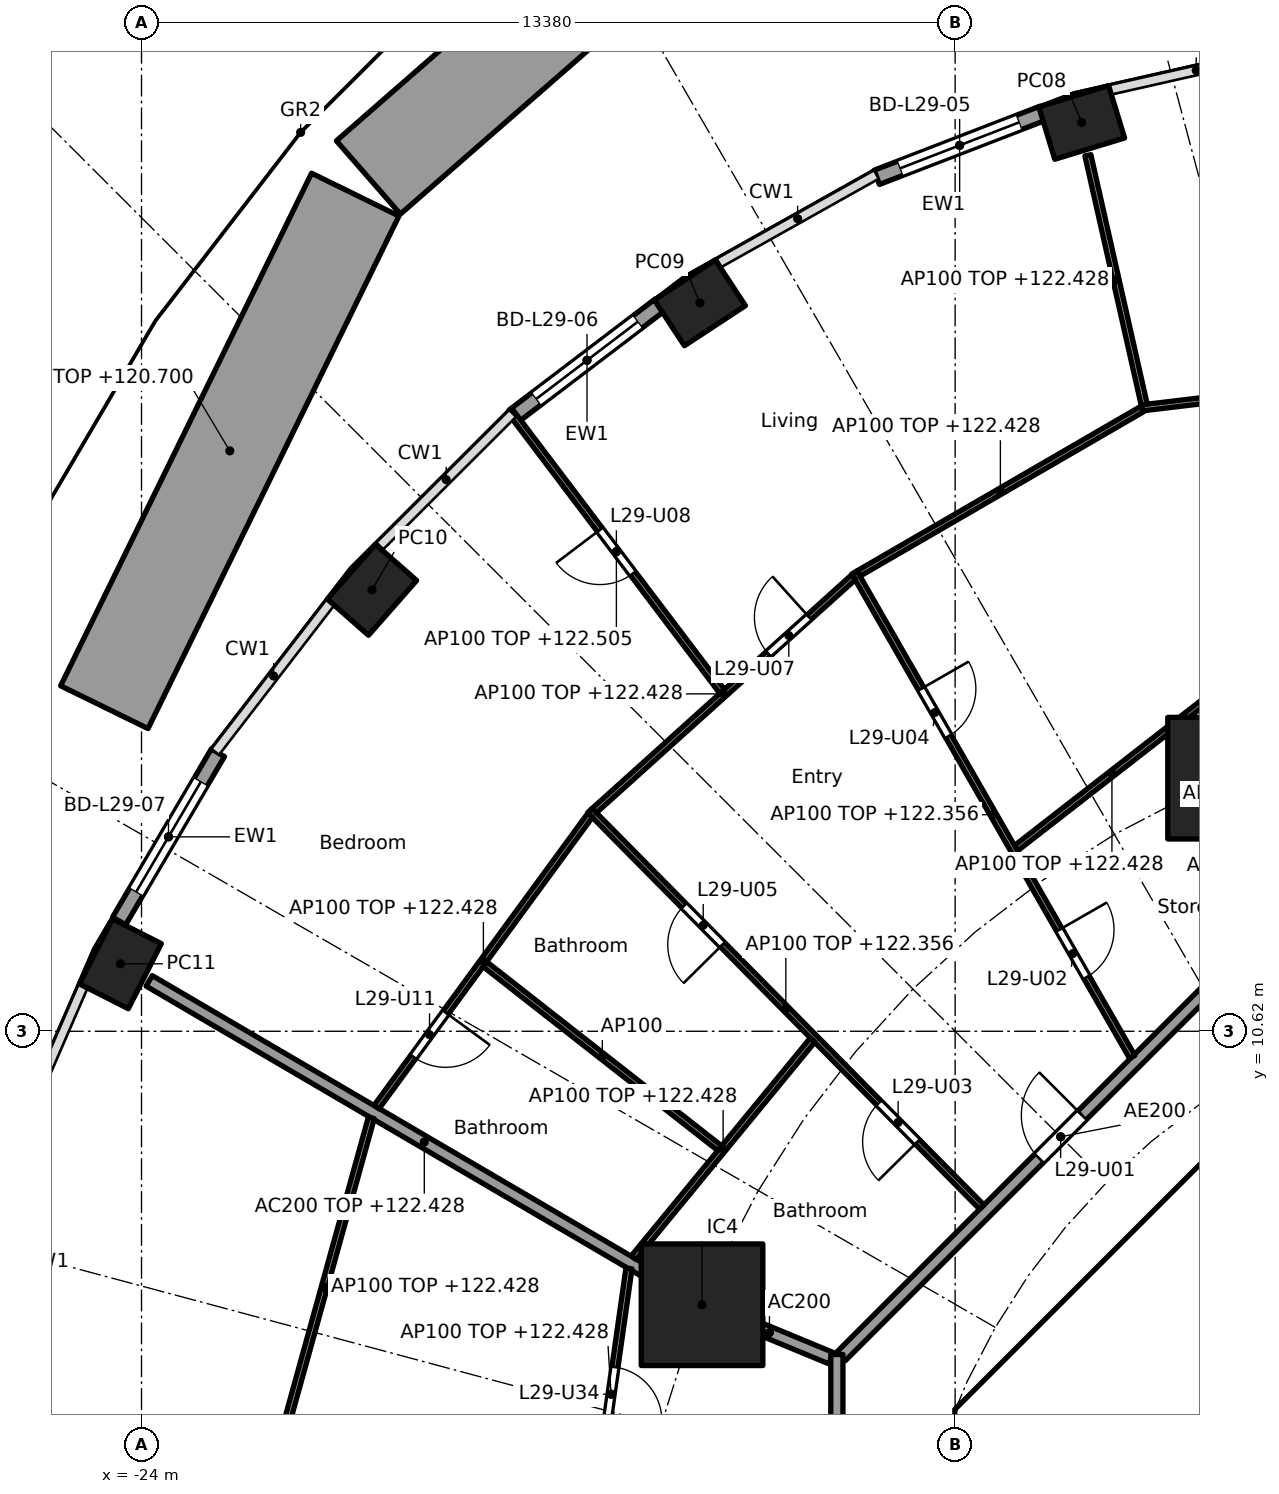
"""IFC4 building model, lengths in metres.
Left out: names, types, materials, properties, quantities, classifications, styles, units other than length and angle.
Written with IfcOpenShell. Run it as: python <this file> out.ifc"""

import sys

from ifc_helpers import new_model, si_unit, direction, frame, frame_2d, origin, origin_2d, place, context, subcontext, project, spatial, polyline, rectangle, hollow_rectangle, outline, extrude, element, fill, save


model = new_model("IFC4")
c1 = context("Model", 3, precision=1e-05, world=origin(), true_north=direction((0.0, 1.0)))
c2 = subcontext(c1, "Body", "Model", "MODEL_VIEW")
j1 = project(units=[si_unit("LENGTHUNIT", "METRE"), si_unit("PLANEANGLEUNIT", "RADIAN")], contexts=[c1])
p1 = place(None, origin())
s1 = spatial("IfcSite", under=j1, at=p1, CompositionType="ELEMENT")
p2 = place(p1, origin())
s2 = spatial("IfcBuilding", under=s1, at=p2, CompositionType="ELEMENT")
p3 = place(p2, frame((0.0, 0.0, 119.6)))
s3 = spatial("IfcBuildingStorey", under=s2, at=p3, CompositionType="ELEMENT", Elevation=119.6)
for number, where, z_axis, x_axis in (
    (1, (-8.538, 25.565, -0.26), (0.0, 0.0, 1.0), (-0.957, -0.292, 0.0)),
    (2, (-14.817, 22.599, -0.26), (0.0, 0.0, 1.0), (-0.836, -0.549, 0.0)),
    (3, (-20.209, 17.88, -0.26), (0.0, 0.0, 1.0), (-0.66, -0.751, 0.0)),
    (4, (-24.347, 11.73, -0.26), (0.0, 0.0, 1.0), (-0.452, -0.892, 0.0)),
):
    element("IfcColumn", number, at=place(p3, frame(where, z_axis=z_axis, x_axis=x_axis)), inside=s3, PredefinedType="COLUMN", context=c2, shape_type="SweptSolid", body=[
        extrude(hollow_rectangle(XDim=1.2, YDim=0.9, WallThickness=0.04, at=origin_2d()), origin(), (0.0, 0.0, 1.0), 3.96),
    ])
for number, where, z_axis, x_axis in (
    (5, (-6.123, 14.782, 0.0), (0.0, 0.0, 1.0), (1.0, 0.0, 0.0)),
    (6, (-14.782, 6.123, 0.0), (0.0, 0.0, 1.0), (1.0, 0.0, 0.0)),
):
    element("IfcColumn", number, at=place(p3, frame(where, z_axis=z_axis, x_axis=x_axis)), inside=s3, PredefinedType="COLUMN", context=c2, shape_type="SweptSolid", body=[
        extrude(rectangle(XDim=2.0, YDim=2.0, at=origin_2d()), origin(), (0.0, 0.0, 1.0), 3.7),
    ])
p4 = place(p3, frame((-11.909, 24.662, 0.0), z_axis=(0.0, 0.0, 1.0), x_axis=(0.932845344347, 0.360277064952, 0.0)))
e7 = element("IfcWall", 7, at=p4, inside=s3, PredefinedType="SOLIDWALL", context=c2, shape_type="SweptSolid", body=[
    extrude(rectangle(XDim=2.923, YDim=0.25, at=frame_2d((1.462, 0.0))), origin(), (0.0, 0.0, 1.0), 3.44),
])
p5 = place(p4, frame((0.412, 0.0, 0.0)))
e8 = element("IfcOpeningElement", 8, at=p5, cuts=e7, PredefinedType="OPENING", context=c2, shape_type="SweptSolid", body=[
    extrude(rectangle(XDim=2.1, YDim=2.4, at=frame_2d((1.05, 1.2))), frame((0.0, 0.135, 0.0), z_axis=(0.0, -1.0, 0.0), x_axis=(1.0, 0.0, 0.0)), (0.0, 0.0, 1.0), 0.27),
])
p6 = place(p3, frame((-17.878, 20.738, 0.0), z_axis=(0.0, 0.0, 1.0), x_axis=(0.796022231079, 0.605267385233, 0.0)))
e9 = element("IfcWall", 9, at=p6, inside=s3, PredefinedType="SOLIDWALL", context=c2, shape_type="SweptSolid", body=[
    extrude(rectangle(XDim=3.026, YDim=0.25, at=frame_2d((1.513, 0.0))), origin(), (0.0, 0.0, 1.0), 3.44),
])
p7 = place(p6, frame((0.463, 0.0, 0.0)))
e10 = element("IfcOpeningElement", 10, at=p7, cuts=e9, PredefinedType="OPENING", context=c2, shape_type="SweptSolid", body=[
    extrude(rectangle(XDim=2.1, YDim=2.4, at=frame_2d((1.05, 1.2))), frame((0.0, 0.135, 0.0), z_axis=(0.0, -1.0, 0.0), x_axis=(1.0, 0.0, 0.0)), (0.0, 0.0, 1.0), 0.27),
])
p8 = place(p3, frame((-24.368, 12.434, 0.0), z_axis=(0.0, 0.0, 1.0), x_axis=(0.506314982873, 0.862348617508, 0.0)))
e11 = element("IfcWall", 11, at=p8, inside=s3, PredefinedType="SOLIDWALL", context=c2, shape_type="SweptSolid", body=[
    extrude(rectangle(XDim=3.208, YDim=0.25, at=frame_2d((1.604, 0.0))), origin(), (0.0, 0.0, 1.0), 3.44),
])
p9 = place(p8, frame((0.554, 0.0, 0.0)))
e12 = element("IfcOpeningElement", 12, at=p9, cuts=e11, PredefinedType="OPENING", context=c2, shape_type="SweptSolid", body=[
    extrude(rectangle(XDim=2.1, YDim=2.4, at=frame_2d((1.05, 1.2))), frame((0.0, 0.135, 0.0), z_axis=(0.0, -1.0, 0.0), x_axis=(1.0, 0.0, 0.0)), (0.0, 0.0, 1.0), 0.27),
])
p10 = place(p3, frame((-24.612, 15.95, 0.0), z_axis=(0.0, 0.0, 1.0), x_axis=(0.439706021751, 0.898141756314, 0.0)))
e13 = element("IfcWall", 13, at=p10, inside=s3, PredefinedType="SOLIDWALL", context=c2, shape_type="SweptSolid", body=[
    extrude(rectangle(XDim=9.385, YDim=1.6, at=frame_2d((4.693, 0.0))), origin(), (0.0, 0.0, 1.0), 1.1),
])
p11 = place(p3, frame((-20.269, 24.661, 0.0), z_axis=(0.0, 0.0, 1.0), x_axis=(0.753205457943, 0.657785328299, 0.0)))
e14 = element("IfcWall", 14, at=p11, inside=s3, PredefinedType="SOLIDWALL", context=c2, shape_type="SweptSolid", body=[
    extrude(rectangle(XDim=6.924, YDim=1.6, at=frame_2d((3.462, 0.0))), origin(), (0.0, 0.0, 1.0), 1.1),
])
p12 = place(p3, frame((-4.613, 9.988, 0.0), z_axis=(0.0, 0.0, 1.0), x_axis=(-0.707106781187, -0.707106781187, 0.0)))
e15 = element("IfcWall", 15, at=p12, inside=s3, PredefinedType="SHEAR", context=c2, shape_type="SweptSolid", body=[
    extrude(rectangle(XDim=7.602, YDim=0.6, at=frame_2d((3.801, 0.0))), origin(), (0.0, 0.0, 1.0), 3.44),
])
p13 = place(p12, frame((0.351, 0.0, 0.0)))
e16 = element("IfcOpeningElement", 16, at=p13, cuts=e15, PredefinedType="OPENING", context=c2, shape_type="SweptSolid", body=[
    extrude(rectangle(XDim=1.1, YDim=2.1, at=frame_2d((0.55, 1.05))), frame((0.0, 0.31, 0.0), z_axis=(0.0, -1.0, 0.0), x_axis=(1.0, 0.0, 0.0)), (0.0, 0.0, 1.0), 0.62),
])
p14 = place(p3, origin())
e17 = element("IfcWall", 17, at=p14, inside=s3, PredefinedType="SHEAR", context=c2, shape_type="SweptSolid", body=[
    extrude(outline(polyline([(-10.2, 4.825), (-9.776, 4.401), (-10.025, 4.152), (-10.025, 3.801), (-10.625, 3.801), (-10.625, 4.401), (-10.2, 4.825)])), origin(), (0.0, 0.0, 1.0), 3.44),
])
p15 = place(p3, frame((-12.657, 5.243, 0.0), z_axis=(0.0, 0.0, 1.0), x_axis=(-0.923869415315, 0.382707856524, 0.0)))
e18 = element("IfcWall", 18, at=p15, inside=s3, PredefinedType="PARTITIONING", context=c2, shape_type="SweptSolid", body=[
    extrude(rectangle(XDim=2.2, YDim=0.2, at=frame_2d((1.1, 0.0))), origin(), (0.0, 0.0, 1.0), 3.44),
])
p16 = place(p3, frame((-14.825, 6.148, 0.0), z_axis=(0.0, 0.0, 1.0), x_axis=(-0.862852031662, 0.505456597006, 0.0)))
e19 = element("IfcWall", 19, at=p16, inside=s3, PredefinedType="PARTITIONING", context=c2, shape_type="SweptSolid", body=[
    extrude(rectangle(XDim=10.487, YDim=0.2, at=frame_2d((5.244, 0.0))), origin(), (0.0, 0.0, 1.0), 2.828),
])
p17 = place(p3, frame((-5.275, 12.494, 0.0), z_axis=(0.0, 0.0, 1.0), x_axis=(-0.707106781187, -0.707106781187, 0.0)))
e20 = element("IfcWall", 20, at=p17, inside=s3, PredefinedType="PARTITIONING", context=c2, shape_type="SweptSolid", body=[
    extrude(rectangle(XDim=10.209, YDim=0.2, at=frame_2d((5.104, 0.0))), origin(), (0.0, 0.0, 1.0), 3.44),
])
p18 = place(p17, frame((4.604, 0.0, 0.0)))
e21 = element("IfcOpeningElement", 21, at=p18, cuts=e20, PredefinedType="OPENING", context=c2, shape_type="SweptSolid", body=[
    extrude(rectangle(XDim=1.0, YDim=2.1, at=frame_2d((0.5, 1.05))), frame((0.0, 0.11, 0.0), z_axis=(0.0, -1.0, 0.0), x_axis=(1.0, 0.0, 0.0)), (0.0, 0.0, 1.0), 0.22),
])
p19 = place(p3, frame((-12.565, 5.304, 0.0), z_axis=(0.0, 0.0, 1.0), x_axis=(0.0, -1.0, 0.0)))
e22 = element("IfcWall", 22, at=p19, inside=s3, PredefinedType="PARTITIONING", context=c2, shape_type="SweptSolid", body=[
    extrude(rectangle(XDim=10.409, YDim=0.2, at=frame_2d((5.205, 0.0))), origin(), (0.0, 0.0, 1.0), 3.44),
])
p20 = place(p3, frame((-1.825, 21.557, 0.0), z_axis=(0.0, 0.0, 1.0), x_axis=(-0.992915657947, -0.118821278412, 0.0)))
e23 = element("IfcWall", 23, at=p20, inside=s3, PredefinedType="PARTITIONING", context=c2, shape_type="SweptSolid", body=[
    extrude(rectangle(XDim=5.765, YDim=0.1, at=frame_2d((2.883, 0.0))), origin(), (0.0, 0.0, 1.0), 2.828),
])
p21 = place(p20, frame((2.408, 0.0, 0.0)))
e24 = element("IfcOpeningElement", 24, at=p21, cuts=e23, PredefinedType="OPENING", context=c2, shape_type="SweptSolid", body=[
    extrude(rectangle(XDim=0.9, YDim=2.1, at=frame_2d((0.45, 1.05))), frame((0.0, 0.06, 0.0), z_axis=(0.0, -1.0, 0.0), x_axis=(1.0, 0.0, 0.0)), (0.0, 0.0, 1.0), 0.12),
])
p22 = place(p3, frame((-6.463, 16.084, 0.0), z_axis=(0.0, 0.0, 1.0), x_axis=(-0.789457442969, -0.613805299538, 0.0)))
e25 = element("IfcWall", 25, at=p22, inside=s3, PredefinedType="PARTITIONING", context=c2, shape_type="SweptSolid", body=[
    extrude(rectangle(XDim=3.997, YDim=0.1, at=frame_2d((1.999, 0.0))), origin(), (0.0, 0.0, 1.0), 2.828),
])
p23 = place(p3, frame((-7.511, 20.927, 0.0), z_axis=(0.0, 0.0, 1.0), x_axis=(-0.220337559031, 0.975423682345, 0.0)))
e26 = element("IfcWall", 26, at=p23, inside=s3, PredefinedType="PARTITIONING", context=c2, shape_type="SweptSolid", body=[
    extrude(rectangle(XDim=4.202, YDim=0.1, at=frame_2d((2.101, 0.0))), origin(), (0.0, 0.0, 1.0), 2.828),
])
p24 = place(p3, frame((-7.543, 20.853, 0.0), z_axis=(0.0, 0.0, 1.0), x_axis=(-0.865086194899, -0.501623240485, 0.0)))
e27 = element("IfcWall", 27, at=p24, inside=s3, PredefinedType="PARTITIONING", context=c2, shape_type="SweptSolid", body=[
    extrude(rectangle(XDim=5.393, YDim=0.1, at=frame_2d((2.697, 0.0))), origin(), (0.0, 0.0, 1.0), 2.828),
])
p25 = place(p3, frame((-7.708, 10.198, 0.0), z_axis=(0.0, 0.0, 1.0), x_axis=(-0.497449462689, 0.867492957937, 0.0)))
e28 = element("IfcWall", 28, at=p25, inside=s3, PredefinedType="PARTITIONING", context=c2, shape_type="SweptSolid", body=[
    extrude(rectangle(XDim=9.185, YDim=0.1, at=frame_2d((4.592, 0.0))), origin(), (0.0, 0.0, 1.0), 2.756),
])
p26 = place(p25, frame((1.511, 0.0, 0.0)))
e29 = element("IfcOpeningElement", 29, at=p26, cuts=e28, PredefinedType="OPENING", context=c2, shape_type="SweptSolid", body=[
    extrude(rectangle(XDim=0.9, YDim=2.1, at=frame_2d((0.45, 1.05))), frame((0.0, 0.06, 0.0), z_axis=(0.0, -1.0, 0.0), x_axis=(1.0, 0.0, 0.0)), (0.0, 0.0, 1.0), 0.12),
])
p27 = place(p25, frame((6.078, 0.0, 0.0)))
e30 = element("IfcOpeningElement", 30, at=p27, cuts=e28, PredefinedType="OPENING", context=c2, shape_type="SweptSolid", body=[
    extrude(rectangle(XDim=0.9, YDim=2.1, at=frame_2d((0.45, 1.05))), frame((0.0, 0.06, 0.0), z_axis=(0.0, -1.0, 0.0), x_axis=(1.0, 0.0, 0.0)), (0.0, 0.0, 1.0), 0.12),
])
p28 = place(p3, frame((-12.289, 18.089, 0.0), z_axis=(0.0, 0.0, 1.0), x_axis=(-0.743146066164, -0.669129228435, 0.0)))
e31 = element("IfcWall", 31, at=p28, inside=s3, PredefinedType="PARTITIONING", context=c2, shape_type="SweptSolid", body=[
    extrude(rectangle(XDim=5.739, YDim=0.1, at=frame_2d((2.87, 0.0))), origin(), (0.0, 0.0, 1.0), 2.828),
])
p29 = place(p28, frame((0.985, 0.0, 0.0)))
e32 = element("IfcOpeningElement", 32, at=p29, cuts=e31, PredefinedType="OPENING", context=c2, shape_type="SweptSolid", body=[
    extrude(rectangle(XDim=0.9, YDim=2.1, at=frame_2d((0.45, 1.05))), frame((0.0, 0.06, 0.0), z_axis=(0.0, -1.0, 0.0), x_axis=(1.0, 0.0, 0.0)), (0.0, 0.0, 1.0), 0.12),
])
p30 = place(p3, frame((-14.452, 16.208, 0.0), z_axis=(0.0, 0.0, 1.0), x_axis=(-0.603267974074, 0.797538557975, 0.0)))
e33 = element("IfcWall", 33, at=p30, inside=s3, PredefinedType="PARTITIONING", context=c2, shape_type="SweptSolid", body=[
    extrude(rectangle(XDim=5.764, YDim=0.1, at=frame_2d((2.882, 0.0))), origin(), (0.0, 0.0, 1.0), 2.905),
])
p31 = place(p30, frame((2.432, 0.0, 0.0)))
e34 = element("IfcOpeningElement", 34, at=p31, cuts=e33, PredefinedType="OPENING", context=c2, shape_type="SweptSolid", body=[
    extrude(rectangle(XDim=0.9, YDim=2.1, at=frame_2d((0.45, 1.05))), frame((0.0, 0.06, 0.0), z_axis=(0.0, -1.0, 0.0), x_axis=(1.0, 0.0, 0.0)), (0.0, 0.0, 1.0), 0.12),
])
p32 = place(p3, frame((-10.182, 7.729, 0.0), z_axis=(0.0, 0.0, 1.0), x_axis=(-0.702927211734, 0.711261790766, 0.0)))
e35 = element("IfcWall", 35, at=p32, inside=s3, PredefinedType="PARTITIONING", context=c2, shape_type="SweptSolid", body=[
    extrude(rectangle(XDim=9.168, YDim=0.1, at=frame_2d((4.584, 0.0))), origin(), (0.0, 0.0, 1.0), 2.756),
])
p33 = place(p32, frame((1.507, 0.0, 0.0)))
e36 = element("IfcOpeningElement", 36, at=p33, cuts=e35, PredefinedType="OPENING", context=c2, shape_type="SweptSolid", body=[
    extrude(rectangle(XDim=0.9, YDim=2.1, at=frame_2d((0.45, 1.05))), frame((0.0, 0.06, 0.0), z_axis=(0.0, -1.0, 0.0), x_axis=(1.0, 0.0, 0.0)), (0.0, 0.0, 1.0), 0.12),
])
p34 = place(p32, frame((6.067, 0.0, 0.0)))
e37 = element("IfcOpeningElement", 37, at=p34, cuts=e35, PredefinedType="OPENING", context=c2, shape_type="SweptSolid", body=[
    extrude(rectangle(XDim=0.9, YDim=2.1, at=frame_2d((0.45, 1.05))), frame((0.0, 0.06, 0.0), z_axis=(0.0, -1.0, 0.0), x_axis=(1.0, 0.0, 0.0)), (0.0, 0.0, 1.0), 0.12),
])
p35 = place(p3, frame((-12.965, 10.475, 0.0), z_axis=(0.0, 0.0, 1.0), x_axis=(-0.634943961338, -0.772558195841, 0.0)))
e38 = element("IfcWall", 38, at=p35, inside=s3, PredefinedType="PARTITIONING", context=c2, shape_type="SweptSolid", body=[
    extrude(rectangle(XDim=4.632, YDim=0.1, at=frame_2d((2.316, 0.0))), origin(), (0.0, 0.0, 1.0), 2.828),
])
p36 = place(p3, frame((-16.621, 14.174, 0.0), z_axis=(0.0, 0.0, 1.0), x_axis=(-0.590674917338, -0.806909624449, 0.0)))
e39 = element("IfcWall", 39, at=p36, inside=s3, PredefinedType="PARTITIONING", context=c2, shape_type="SweptSolid", body=[
    extrude(rectangle(XDim=5.949, YDim=0.1, at=frame_2d((2.975, 0.0))), origin(), (0.0, 0.0, 1.0), 2.828),
])
p37 = place(p36, frame((4.024, 0.0, 0.0)))
e40 = element("IfcOpeningElement", 40, at=p37, cuts=e39, PredefinedType="OPENING", context=c2, shape_type="SweptSolid", body=[
    extrude(rectangle(XDim=0.9, YDim=2.1, at=frame_2d((0.45, 1.05))), frame((0.0, 0.06, 0.0), z_axis=(0.0, -1.0, 0.0), x_axis=(1.0, 0.0, 0.0)), (0.0, 0.0, 1.0), 0.12),
])
p38 = place(p3, frame((-14.491, 8.697, 0.0), z_axis=(0.0, 0.0, 1.0), x_axis=(-0.787139479951, 0.616775031193, 0.0)))
e41 = element("IfcWall", 41, at=p38, inside=s3, PredefinedType="PARTITIONING", context=c2, shape_type="SweptSolid", body=[
    extrude(rectangle(XDim=4.907, YDim=0.1, at=frame_2d((2.453, 0.0))), origin(), (0.0, 0.0, 1.0), 3.44),
])
p39 = place(p3, frame((-15.984, 6.72, 0.0), z_axis=(0.0, 0.0, 1.0), x_axis=(-0.140684869512, -0.990054426529, 0.0)))
e42 = element("IfcWall", 42, at=p39, inside=s3, PredefinedType="PARTITIONING", context=c2, shape_type="SweptSolid", body=[
    extrude(rectangle(XDim=4.177, YDim=0.1, at=frame_2d((2.088, 0.0))), origin(), (0.0, 0.0, 1.0), 2.828),
])
p40 = place(p39, frame((1.638, 0.0, 0.0)))
e43 = element("IfcOpeningElement", 43, at=p40, cuts=e42, PredefinedType="OPENING", context=c2, shape_type="SweptSolid", body=[
    extrude(rectangle(XDim=0.9, YDim=2.1, at=frame_2d((0.45, 1.05))), frame((0.0, 0.06, 0.0), z_axis=(0.0, -1.0, 0.0), x_axis=(1.0, 0.0, 0.0)), (0.0, 0.0, 1.0), 0.12),
])
p41 = place(p3, frame((-20.221, 9.197, 0.0), z_axis=(0.0, 0.0, 1.0), x_axis=(-0.267398009191, -0.963586168789, 0.0)))
e44 = element("IfcWall", 44, at=p41, inside=s3, PredefinedType="PARTITIONING", context=c2, shape_type="SweptSolid", body=[
    extrude(rectangle(XDim=5.788, YDim=0.1, at=frame_2d((2.894, 0.0))), origin(), (0.0, 0.0, 1.0), 2.828),
])
p42 = place(p5, origin())
e45 = element("IfcDoor", 45, at=p42, inside=s3, OperationType="SLIDING_TO_LEFT", PredefinedType="DOOR", context=c2, shape_type="SweptSolid", body=[
    extrude(rectangle(XDim=2.1, YDim=2.4, at=frame_2d((1.05, 1.2))), frame((0.0, 0.025, 0.0), z_axis=(0.0, -1.0, 0.0), x_axis=(1.0, 0.0, 0.0)), (0.0, 0.0, 1.0), 0.05),
])
fill(e8, e45)
p43 = place(p7, origin())
e46 = element("IfcDoor", 46, at=p43, inside=s3, OperationType="SLIDING_TO_LEFT", PredefinedType="DOOR", context=c2, shape_type="SweptSolid", body=[
    extrude(rectangle(XDim=2.1, YDim=2.4, at=frame_2d((1.05, 1.2))), frame((0.0, 0.025, 0.0), z_axis=(0.0, -1.0, 0.0), x_axis=(1.0, 0.0, 0.0)), (0.0, 0.0, 1.0), 0.05),
])
fill(e10, e46)
p44 = place(p9, origin())
e47 = element("IfcDoor", 47, at=p44, inside=s3, OperationType="SLIDING_TO_LEFT", PredefinedType="DOOR", context=c2, shape_type="SweptSolid", body=[
    extrude(rectangle(XDim=2.1, YDim=2.4, at=frame_2d((1.05, 1.2))), frame((0.0, 0.025, 0.0), z_axis=(0.0, -1.0, 0.0), x_axis=(1.0, 0.0, 0.0)), (0.0, 0.0, 1.0), 0.05),
])
fill(e12, e47)
p45 = place(p18, frame((1.0, 0.0, 0.0), x_axis=(-1.0, 0.0, 0.0)))
e48 = element("IfcDoor", 48, at=p45, inside=s3, OperationType="SINGLE_SWING_RIGHT", PredefinedType="DOOR", context=c2, shape_type="SweptSolid", body=[
    extrude(rectangle(XDim=1.0, YDim=2.1, at=frame_2d((0.5, 1.05))), frame((0.0, 0.025, 0.0), z_axis=(0.0, -1.0, 0.0), x_axis=(1.0, 0.0, 0.0)), (0.0, 0.0, 1.0), 0.05),
])
fill(e21, e48)
p46 = place(p26, frame((0.9, 0.0, 0.0), x_axis=(-1.0, 0.0, 0.0)))
e49 = element("IfcDoor", 49, at=p46, inside=s3, OperationType="SINGLE_SWING_LEFT", PredefinedType="DOOR", context=c2, shape_type="SweptSolid", body=[
    extrude(rectangle(XDim=0.9, YDim=2.1, at=frame_2d((0.45, 1.05))), frame((0.0, 0.025, 0.0), z_axis=(0.0, -1.0, 0.0), x_axis=(1.0, 0.0, 0.0)), (0.0, 0.0, 1.0), 0.05),
])
fill(e29, e49)
p47 = place(p33, origin())
e50 = element("IfcDoor", 50, at=p47, inside=s3, OperationType="SINGLE_SWING_LEFT", PredefinedType="DOOR", context=c2, shape_type="SweptSolid", body=[
    extrude(rectangle(XDim=0.9, YDim=2.1, at=frame_2d((0.45, 1.05))), frame((0.0, 0.025, 0.0), z_axis=(0.0, -1.0, 0.0), x_axis=(1.0, 0.0, 0.0)), (0.0, 0.0, 1.0), 0.05),
])
fill(e36, e50)
p48 = place(p27, frame((0.9, 0.0, 0.0), x_axis=(-1.0, 0.0, 0.0)))
e51 = element("IfcDoor", 51, at=p48, inside=s3, OperationType="SINGLE_SWING_LEFT", PredefinedType="DOOR", context=c2, shape_type="SweptSolid", body=[
    extrude(rectangle(XDim=0.9, YDim=2.1, at=frame_2d((0.45, 1.05))), frame((0.0, 0.025, 0.0), z_axis=(0.0, -1.0, 0.0), x_axis=(1.0, 0.0, 0.0)), (0.0, 0.0, 1.0), 0.05),
])
fill(e30, e51)
p49 = place(p34, origin())
e52 = element("IfcDoor", 52, at=p49, inside=s3, OperationType="SINGLE_SWING_LEFT", PredefinedType="DOOR", context=c2, shape_type="SweptSolid", body=[
    extrude(rectangle(XDim=0.9, YDim=2.1, at=frame_2d((0.45, 1.05))), frame((0.0, 0.025, 0.0), z_axis=(0.0, -1.0, 0.0), x_axis=(1.0, 0.0, 0.0)), (0.0, 0.0, 1.0), 0.05),
])
fill(e37, e52)
p50 = place(p29, frame((0.9, 0.0, 0.0), x_axis=(-1.0, 0.0, 0.0)))
e53 = element("IfcDoor", 53, at=p50, inside=s3, OperationType="SINGLE_SWING_RIGHT", PredefinedType="DOOR", context=c2, shape_type="SweptSolid", body=[
    extrude(rectangle(XDim=0.9, YDim=2.1, at=frame_2d((0.45, 1.05))), frame((0.0, 0.025, 0.0), z_axis=(0.0, -1.0, 0.0), x_axis=(1.0, 0.0, 0.0)), (0.0, 0.0, 1.0), 0.05),
])
fill(e32, e53)
p51 = place(p31, origin())
e54 = element("IfcDoor", 54, at=p51, inside=s3, OperationType="SINGLE_SWING_RIGHT", PredefinedType="DOOR", context=c2, shape_type="SweptSolid", body=[
    extrude(rectangle(XDim=0.9, YDim=2.1, at=frame_2d((0.45, 1.05))), frame((0.0, 0.025, 0.0), z_axis=(0.0, -1.0, 0.0), x_axis=(1.0, 0.0, 0.0)), (0.0, 0.0, 1.0), 0.05),
])
fill(e34, e54)
p52 = place(p37, origin())
e55 = element("IfcDoor", 55, at=p52, inside=s3, OperationType="SINGLE_SWING_LEFT", PredefinedType="DOOR", context=c2, shape_type="SweptSolid", body=[
    extrude(rectangle(XDim=0.9, YDim=2.1, at=frame_2d((0.45, 1.05))), frame((0.0, 0.025, 0.0), z_axis=(0.0, -1.0, 0.0), x_axis=(1.0, 0.0, 0.0)), (0.0, 0.0, 1.0), 0.05),
])
fill(e40, e55)
p53 = place(p40, origin())
e56 = element("IfcDoor", 56, at=p53, inside=s3, OperationType="SINGLE_SWING_RIGHT", PredefinedType="DOOR", context=c2, shape_type="SweptSolid", body=[
    extrude(rectangle(XDim=0.9, YDim=2.1, at=frame_2d((0.45, 1.05))), frame((0.0, 0.025, 0.0), z_axis=(0.0, -1.0, 0.0), x_axis=(1.0, 0.0, 0.0)), (0.0, 0.0, 1.0), 0.05),
])
fill(e43, e56)
save(model, sys.argv[1])
